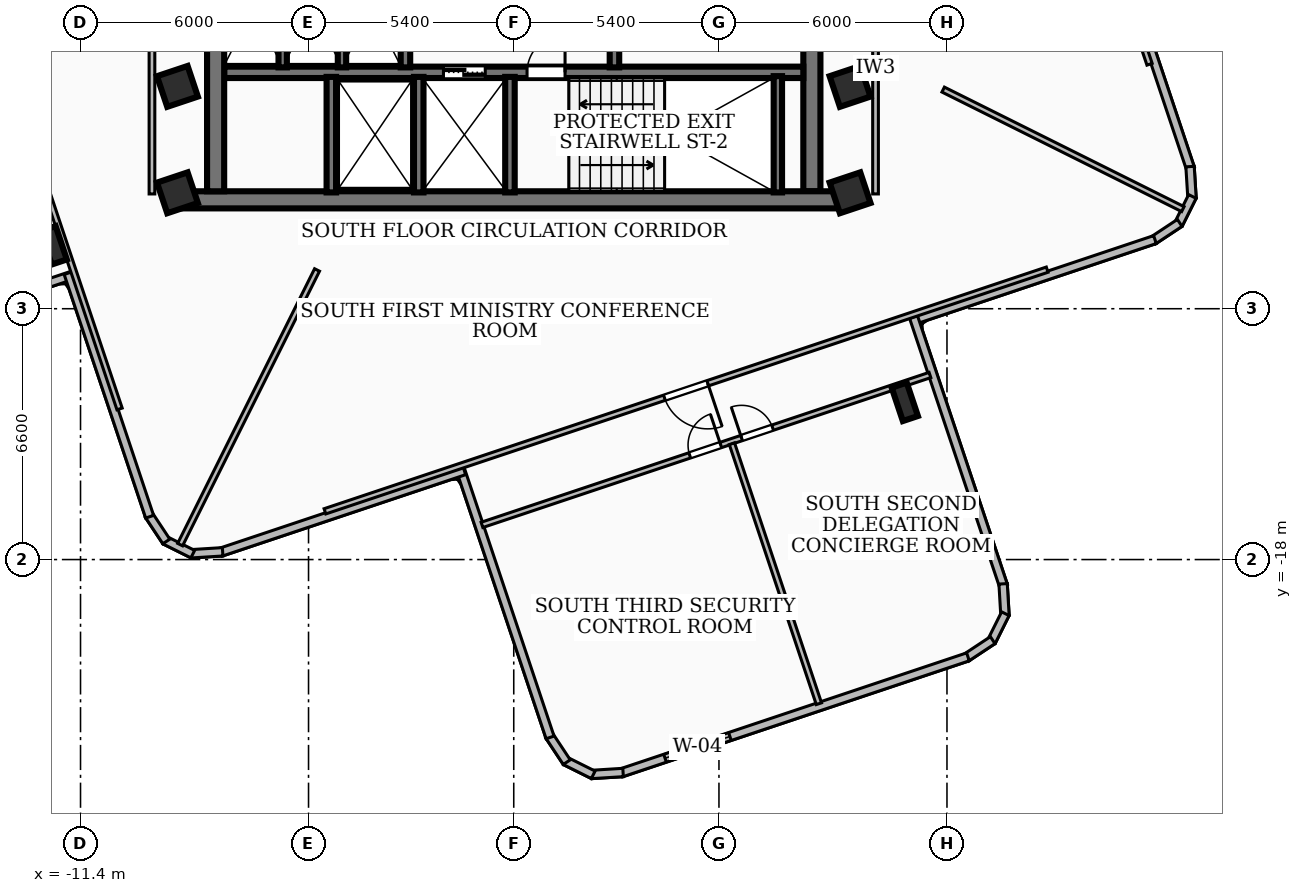
"""IFC4 building model, lengths in metres.
Left out: names, types, materials, properties, quantities, classifications, styles, units other than length and angle.
Written with IfcOpenShell. Run it as: python <this file> out.ifc"""

import sys

from ifc_helpers import new_model, si_unit, direction, frame, frame_2d, origin, origin_2d, place, context, subcontext, project, spatial, rectangle, i_section, extrude, element, fill, save


model = new_model("IFC4")
c1 = context("Model", 3, precision=1e-05, world=origin(), true_north=direction((0.0, 1.0)))
c2 = subcontext(c1, "Body", "Model", "MODEL_VIEW")
j1 = project(units=[si_unit("LENGTHUNIT", "METRE"), si_unit("PLANEANGLEUNIT", "RADIAN")], contexts=[c1])
p1 = place(None, origin())
s1 = spatial("IfcSite", under=j1, at=p1, CompositionType="ELEMENT")
p2 = place(p1, origin())
s2 = spatial("IfcBuilding", under=s1, at=p2, CompositionType="ELEMENT")
p3 = place(p2, frame((0.0, 0.0, 159.48)))
s3 = spatial("IfcBuildingStorey", under=s2, at=p3, CompositionType="ELEMENT", Elevation=159.48)
p4 = place(p3, frame((8.78, -8.535, 0.0), z_axis=(0.0, 0.0, 1.0), x_axis=(-1.0, 0.0, 0.0)))
e1 = element("IfcWall", 1, at=p4, inside=s3, PredefinedType="SHEAR", context=c2, shape_type="SweptSolid", body=[
    extrude(rectangle(XDim=17.56, YDim=0.45, at=frame_2d((8.78, 0.0))), origin(), (0.0, 0.0, 1.0), 3.34),
])
for number, where, z_axis, x_axis in (
    (2, (-7.845, -8.31, 0.0), (0.0, 0.0, 1.0), (0.0, 1.0, 0.0)),
    (3, (7.845, -1.975, 0.0), (0.0, 0.0, 1.0), (0.0, -1.0, 0.0)),
):
    element("IfcWall", number, at=place(p3, frame(where, z_axis=z_axis, x_axis=x_axis)), inside=s3, PredefinedType="SHEAR", context=c2, shape_type="SweptSolid", body=[
        extrude(rectangle(XDim=6.335, YDim=0.45, at=frame_2d((3.167, 0.0))), origin(), (0.0, 0.0, 1.0), 3.34),
    ])
p5 = place(p3, frame((-7.62, -5.18, 0.0), z_axis=(0.0, 0.0, 1.0), x_axis=(1.0, 0.0, 0.0)))
e4 = element("IfcWall", 4, at=p5, inside=s3, PredefinedType="SOLIDWALL", context=c2, shape_type="SweptSolid", body=[
    extrude(rectangle(XDim=15.24, YDim=0.3, at=frame_2d((7.62, 0.0))), origin(), (0.0, 0.0, 1.0), 3.34),
])
p6 = place(p5, frame((5.77, 0.0, 0.0)))
e5 = element("IfcOpeningElement", 5, at=p6, cuts=e4, PredefinedType="OPENING", context=c2, shape_type="SweptSolid", body=[
    extrude(rectangle(XDim=1.1, YDim=2.15, at=frame_2d((0.55, 1.075))), frame((0.0, 0.16, 0.0), z_axis=(0.0, -1.0, 0.0), x_axis=(1.0, 0.0, 0.0)), (0.0, 0.0, 1.0), 0.32),
])
p7 = place(p5, frame((7.97, 0.0, 0.0)))
e6 = element("IfcOpeningElement", 6, at=p7, cuts=e4, PredefinedType="OPENING", context=c2, shape_type="SweptSolid", body=[
    extrude(rectangle(XDim=1.0, YDim=2.1, at=frame_2d((0.5, 1.05))), frame((0.0, 0.16, 0.0), z_axis=(0.0, -1.0, 0.0), x_axis=(1.0, 0.0, 0.0)), (0.0, 0.0, 1.0), 0.32),
])
p8 = place(p3, frame((6.95, -8.34, 0.0), z_axis=(0.0, 0.0, 1.0), x_axis=(0.0, 1.0, 0.0)))
e7 = element("IfcWall", 7, at=p8, inside=s3, PredefinedType="SOLIDWALL", context=c2, shape_type="SweptSolid", body=[
    extrude(rectangle(XDim=3.06, YDim=0.22, at=frame_2d((1.53, 0.0))), origin(), (0.0, 0.0, 1.0), 3.34),
])
for number, where, z_axis, x_axis in (
    (8, (-0.1, -8.34, 0.0), (0.0, 0.0, 1.0), (0.0, 1.0, 0.0)),
    (9, (-2.5, -8.34, 0.0), (0.0, 0.0, 1.0), (0.0, 1.0, 0.0)),
    (10, (-4.8, -8.34, 0.0), (0.0, 0.0, 1.0), (0.0, 1.0, 0.0)),
):
    element("IfcWall", number, at=place(p3, frame(where, z_axis=z_axis, x_axis=x_axis)), inside=s3, PredefinedType="SOLIDWALL", context=c2, shape_type="SweptSolid", body=[
        extrude(rectangle(XDim=3.04, YDim=0.25, at=frame_2d((1.52, 0.0))), origin(), (0.0, 0.0, 1.0), 3.34),
    ])
for number, where, z_axis, x_axis in (
    (11, (-2.85, -5.05, 0.0), (0.0, 0.0, 1.0), (0.0, 1.0, 0.0)),
    (12, (2.65, -5.05, 0.0), (0.0, 0.0, 1.0), (0.0, 1.0, 0.0)),
):
    element("IfcWall", number, at=place(p3, frame(where, z_axis=z_axis, x_axis=x_axis)), inside=s3, PredefinedType="SOLIDWALL", context=c2, shape_type="SweptSolid", body=[
        extrude(rectangle(XDim=3.07, YDim=0.25, at=frame_2d((1.535, 0.0))), origin(), (0.0, 0.0, 1.0), 3.34),
    ])
for number, where, z_axis, x_axis in (
    (13, (-6.08, -5.05, 0.0), (0.0, 0.0, 1.0), (0.0, 1.0, 0.0)),
    (14, (-4.52, -5.05, 0.0), (0.0, 0.0, 1.0), (0.0, 1.0, 0.0)),
):
    element("IfcWall", number, at=place(p3, frame(where, z_axis=z_axis, x_axis=x_axis)), inside=s3, PredefinedType="SOLIDWALL", context=c2, shape_type="SweptSolid", body=[
        extrude(rectangle(XDim=3.07, YDim=0.22, at=frame_2d((1.535, 0.0))), origin(), (0.0, 0.0, 1.0), 3.34),
    ])
for number, where, z_axis, x_axis in (
    (15, (-8.85, -5.55, 0.0), (0.0, 0.0, 1.0), (0.948, 0.317, 0.0)),
    (16, (8.85, -5.55, 0.0), (0.0, 0.0, 1.0), (0.948, 0.317, 0.0)),
    (17, (8.85, -8.35, 0.0), (0.0, 0.0, 1.0), (0.948, 0.317, 0.0)),
    (18, (-8.85, -8.35, 0.0), (0.0, 0.0, 1.0), (0.948, 0.317, 0.0)),
):
    element("IfcColumn", number, at=place(p3, frame(where, z_axis=z_axis, x_axis=x_axis)), inside=s3, PredefinedType="COLUMN", context=c2, shape_type="SweptSolid", body=[
        extrude(rectangle(XDim=0.85, YDim=0.85, at=origin_2d()), origin(), (0.0, 0.0, 1.0), 3.6),
    ])
for number, where, z_axis, x_axis in (
    (19, (-12.106, -9.731, 0.0), (0.0, 0.0, 1.0), (0.948, 0.317, 0.0)),
    (20, (3.29, -19.536, 0.0), (0.0, 0.0, 1.0), (0.948, 0.317, 0.0)),
    (21, (10.29, -13.85, 0.0), (0.0, 0.0, 1.0), (0.948, 0.317, 0.0)),
):
    element("IfcColumn", number, at=place(p3, frame(where, z_axis=z_axis, x_axis=x_axis)), inside=s3, PredefinedType="COLUMN", context=c2, shape_type="SweptSolid", body=[
        extrude(i_section(OverallWidth=0.418, OverallDepth=0.927, WebThickness=0.019, FlangeThickness=0.032, at=origin_2d()), origin(), (0.0, 0.0, 1.0), 3.6),
    ])
p9 = place(p3, frame((-11.615, -10.519, 0.0), z_axis=(0.0, 0.0, 1.0), x_axis=(-0.948329626758, -0.317286808759, 0.0)))
e22 = element("IfcWall", 22, at=p9, inside=s3, PredefinedType="SOLIDWALL", context=c2, shape_type="SweptSolid", body=[
    extrude(rectangle(XDim=9.058, YDim=0.22, at=frame_2d((4.529, 0.0))), origin(), (0.0, 0.0, 1.0), 3.34),
])
p10 = place(p9, frame((5.558, 0.0, 0.85)))
e23 = element("IfcOpeningElement", 23, at=p10, cuts=e22, PredefinedType="OPENING", context=c2, shape_type="SweptSolid", body=[
    extrude(rectangle(XDim=2.4, YDim=2.1, at=frame_2d((1.2, 1.05))), frame((0.0, 0.12, 0.0), z_axis=(0.0, -1.0, 0.0), x_axis=(1.0, 0.0, 0.0)), (0.0, 0.0, 1.0), 0.24),
])
p11 = place(p3, frame((15.662, -1.3, 0.0), z_axis=(0.0, 0.0, 1.0), x_axis=(0.317224676093, -0.948350412494, 0.0)))
e24 = element("IfcWall", 24, at=p11, inside=s3, PredefinedType="SOLIDWALL", context=c2, shape_type="SweptSolid", body=[
    extrude(rectangle(XDim=6.758, YDim=0.22, at=frame_2d((3.379, 0.0))), origin(), (0.0, 0.0, 1.0), 3.34),
])
p12 = place(p3, frame((17.796, -7.66, 0.0), z_axis=(0.0, 0.0, 1.0), x_axis=(0.062305442082, -0.998057128569, 0.0)))
e25 = element("IfcWall", 25, at=p12, inside=s3, PredefinedType="SOLIDWALL", context=c2, shape_type="SweptSolid", body=[
    extrude(rectangle(XDim=0.835, YDim=0.22, at=frame_2d((0.417, 0.0))), origin(), (0.0, 0.0, 1.0), 3.34),
])
p13 = place(p3, frame((17.857, -8.446, 0.0), z_axis=(0.0, 0.0, 1.0), x_axis=(-0.446258139106, -0.894904281631, 0.0)))
e26 = element("IfcWall", 26, at=p13, inside=s3, PredefinedType="SOLIDWALL", context=c2, shape_type="SweptSolid", body=[
    extrude(rectangle(XDim=0.818, YDim=0.22, at=frame_2d((0.409, 0.0))), origin(), (0.0, 0.0, 1.0), 3.34),
])
p14 = place(p3, frame((17.524, -9.142, 0.0), z_axis=(0.0, 0.0, 1.0), x_axis=(-0.833756011094, -0.552133058206, 0.0)))
e27 = element("IfcWall", 27, at=p14, inside=s3, PredefinedType="SOLIDWALL", context=c2, shape_type="SweptSolid", body=[
    extrude(rectangle(XDim=0.835, YDim=0.22, at=frame_2d((0.417, 0.0))), origin(), (0.0, 0.0, 1.0), 3.34),
])
p15 = place(p3, frame((16.873, -9.581, 0.0), z_axis=(0.0, 0.0, 1.0), x_axis=(-0.94829606055, -0.317387116224, 0.0)))
e28 = element("IfcWall", 28, at=p15, inside=s3, PredefinedType="SOLIDWALL", context=c2, shape_type="SweptSolid", body=[
    extrude(rectangle(XDim=6.758, YDim=0.22, at=frame_2d((3.379, 0.0))), origin(), (0.0, 0.0, 1.0), 3.34),
])
p16 = place(p3, frame((10.519, -11.615, 0.0), z_axis=(0.0, 0.0, 1.0), x_axis=(0.317347016501, -0.948309480664, 0.0)))
e29 = element("IfcWall", 29, at=p16, inside=s3, PredefinedType="SOLIDWALL", context=c2, shape_type="SweptSolid", body=[
    extrude(rectangle(XDim=7.458, YDim=0.22, at=frame_2d((3.729, 0.0))), origin(), (0.0, 0.0, 1.0), 3.34),
])
p17 = place(p3, frame((12.877, -18.639, 0.0), z_axis=(0.0, 0.0, 1.0), x_axis=(0.05880777677, -0.998269325078, 0.0)))
e30 = element("IfcWall", 30, at=p17, inside=s3, PredefinedType="SOLIDWALL", context=c2, shape_type="SweptSolid", body=[
    extrude(rectangle(XDim=0.834, YDim=0.22, at=frame_2d((0.417, 0.0))), origin(), (0.0, 0.0, 1.0), 3.34),
])
p18 = place(p3, frame((12.936, -19.425, 0.0), z_axis=(0.0, 0.0, 1.0), x_axis=(-0.446258139106, -0.894904281631, 0.0)))
e31 = element("IfcWall", 31, at=p18, inside=s3, PredefinedType="SOLIDWALL", context=c2, shape_type="SweptSolid", body=[
    extrude(rectangle(XDim=0.818, YDim=0.22, at=frame_2d((0.409, 0.0))), origin(), (0.0, 0.0, 1.0), 3.34),
])
p19 = place(p3, frame((12.603, -20.121, 0.0), z_axis=(0.0, 0.0, 1.0), x_axis=(-0.833756011094, -0.552133058206, 0.0)))
e32 = element("IfcWall", 32, at=p19, inside=s3, PredefinedType="SOLIDWALL", context=c2, shape_type="SweptSolid", body=[
    extrude(rectangle(XDim=0.835, YDim=0.22, at=frame_2d((0.417, 0.0))), origin(), (0.0, 0.0, 1.0), 3.34),
])
p20 = place(p3, frame((11.952, -20.56, 0.0), z_axis=(0.0, 0.0, 1.0), x_axis=(-0.94831980895, -0.317316151421, 0.0)))
e33 = element("IfcWall", 33, at=p20, inside=s3, PredefinedType="SOLIDWALL", context=c2, shape_type="SweptSolid", body=[
    extrude(rectangle(XDim=9.621, YDim=0.22, at=frame_2d((4.811, 0.0))), origin(), (0.0, 0.0, 1.0), 3.34),
])
p21 = place(p20, frame((6.605, 0.0, 0.85)))
e34 = element("IfcOpeningElement", 34, at=p21, cuts=e33, PredefinedType="OPENING", context=c2, shape_type="SweptSolid", body=[
    extrude(rectangle(XDim=1.8, YDim=2.0, at=frame_2d((0.9, 1.0))), frame((0.0, 0.12, 0.0), z_axis=(0.0, -1.0, 0.0), x_axis=(1.0, 0.0, 0.0)), (0.0, 0.0, 1.0), 0.24),
])
p22 = place(p3, frame((2.877, -23.603, 0.0), z_axis=(0.0, 0.0, 1.0), x_axis=(-0.998057128569, -0.062305442082, 0.0)))
e35 = element("IfcWall", 35, at=p22, inside=s3, PredefinedType="SOLIDWALL", context=c2, shape_type="SweptSolid", body=[
    extrude(rectangle(XDim=0.835, YDim=0.22, at=frame_2d((0.417, 0.0))), origin(), (0.0, 0.0, 1.0), 3.34),
])
p23 = place(p3, frame((2.091, -23.664, 0.0), z_axis=(0.0, 0.0, 1.0), x_axis=(-0.894963703084, 0.446138958356, 0.0)))
e36 = element("IfcWall", 36, at=p23, inside=s3, PredefinedType="SOLIDWALL", context=c2, shape_type="SweptSolid", body=[
    extrude(rectangle(XDim=0.818, YDim=0.22, at=frame_2d((0.409, 0.0))), origin(), (0.0, 0.0, 1.0), 3.34),
])
p24 = place(p3, frame((1.395, -23.331, 0.0), z_axis=(0.0, 0.0, 1.0), x_axis=(-0.552133058206, 0.833756011094, 0.0)))
e37 = element("IfcWall", 37, at=p24, inside=s3, PredefinedType="SOLIDWALL", context=c2, shape_type="SweptSolid", body=[
    extrude(rectangle(XDim=0.835, YDim=0.22, at=frame_2d((0.417, 0.0))), origin(), (0.0, 0.0, 1.0), 3.34),
])
p25 = place(p3, frame((0.956, -22.68, 0.0), z_axis=(0.0, 0.0, 1.0), x_axis=(-0.317347016501, 0.948309480664, 0.0)))
e38 = element("IfcWall", 38, at=p25, inside=s3, PredefinedType="SOLIDWALL", context=c2, shape_type="SweptSolid", body=[
    extrude(rectangle(XDim=7.458, YDim=0.22, at=frame_2d((3.729, 0.0))), origin(), (0.0, 0.0, 1.0), 3.34),
])
p26 = place(p3, frame((-1.3, -15.662, 0.0), z_axis=(0.0, 0.0, 1.0), x_axis=(-0.948350412494, -0.317224676093, 0.0)))
e39 = element("IfcWall", 39, at=p26, inside=s3, PredefinedType="SOLIDWALL", context=c2, shape_type="SweptSolid", body=[
    extrude(rectangle(XDim=6.758, YDim=0.22, at=frame_2d((3.379, 0.0))), origin(), (0.0, 0.0, 1.0), 3.34),
])
p27 = place(p3, frame((-7.66, -17.796, 0.0), z_axis=(0.0, 0.0, 1.0), x_axis=(-0.998057128569, -0.062305442082, 0.0)))
e40 = element("IfcWall", 40, at=p27, inside=s3, PredefinedType="SOLIDWALL", context=c2, shape_type="SweptSolid", body=[
    extrude(rectangle(XDim=0.835, YDim=0.22, at=frame_2d((0.417, 0.0))), origin(), (0.0, 0.0, 1.0), 3.34),
])
p28 = place(p3, frame((-8.446, -17.857, 0.0), z_axis=(0.0, 0.0, 1.0), x_axis=(-0.894904281631, 0.446258139106, 0.0)))
e41 = element("IfcWall", 41, at=p28, inside=s3, PredefinedType="SOLIDWALL", context=c2, shape_type="SweptSolid", body=[
    extrude(rectangle(XDim=0.818, YDim=0.22, at=frame_2d((0.409, 0.0))), origin(), (0.0, 0.0, 1.0), 3.34),
])
p29 = place(p3, frame((-9.142, -17.524, 0.0), z_axis=(0.0, 0.0, 1.0), x_axis=(-0.552133058206, 0.833756011094, 0.0)))
e42 = element("IfcWall", 42, at=p29, inside=s3, PredefinedType="SOLIDWALL", context=c2, shape_type="SweptSolid", body=[
    extrude(rectangle(XDim=0.835, YDim=0.22, at=frame_2d((0.417, 0.0))), origin(), (0.0, 0.0, 1.0), 3.34),
])
p30 = place(p3, frame((-9.581, -16.873, 0.0), z_axis=(0.0, 0.0, 1.0), x_axis=(-0.317387116224, 0.94829606055, 0.0)))
e43 = element("IfcWall", 43, at=p30, inside=s3, PredefinedType="SOLIDWALL", context=c2, shape_type="SweptSolid", body=[
    extrude(rectangle(XDim=6.758, YDim=0.22, at=frame_2d((3.379, 0.0))), origin(), (0.0, 0.0, 1.0), 3.34),
])
p31 = place(p3, frame((-9.52, -8.38, 0.0), z_axis=(0.0, 0.0, 1.0), x_axis=(0.0, 1.0, 0.0)))
e44 = element("IfcWall", 44, at=p31, inside=s3, PredefinedType="PARTITIONING", context=c2, shape_type="SweptSolid", body=[
    extrude(rectangle(XDim=6.63, YDim=0.15, at=frame_2d((3.315, 0.0))), origin(), (0.0, 0.0, 1.0), 2.644),
])
p32 = place(p3, frame((9.52, -8.38, 0.0), z_axis=(0.0, 0.0, 1.0), x_axis=(0.0, 1.0, 0.0)))
e45 = element("IfcWall", 45, at=p32, inside=s3, PredefinedType="PARTITIONING", context=c2, shape_type="SweptSolid", body=[
    extrude(rectangle(XDim=6.63, YDim=0.15, at=frame_2d((3.315, 0.0))), origin(), (0.0, 0.0, 1.0), 3.34),
])
p33 = place(p3, frame((-5.176, -10.38, 0.0), z_axis=(0.0, 0.0, 1.0), x_axis=(-0.446173290391, -0.894946587759, 0.0)))
e46 = element("IfcWall", 46, at=p33, inside=s3, PredefinedType="PARTITIONING", context=c2, shape_type="SweptSolid", body=[
    extrude(rectangle(XDim=8.075, YDim=0.145, at=frame_2d((4.038, 0.0))), origin(), (0.0, 0.0, 1.0), 3.34),
])
p34 = place(p3, frame((11.3, -5.634, 0.0), z_axis=(0.0, 0.0, 1.0), x_axis=(0.894904738475, -0.446257222972, 0.0)))
e47 = element("IfcWall", 47, at=p34, inside=s3, PredefinedType="PARTITIONING", context=c2, shape_type="SweptSolid", body=[
    extrude(rectangle(XDim=7.048, YDim=0.145, at=frame_2d((3.524, 0.0))), origin(), (0.0, 0.0, 1.0), 3.34),
])
p35 = place(p3, frame((10.372, 14.037, 0.0), z_axis=(0.0, 0.0, 1.0), x_axis=(0.317298382655, -0.94832575435, 0.0)))
e48 = element("IfcWall", 48, at=p35, inside=s3, PredefinedType="PARTITIONING", context=c2, shape_type="SweptSolid", body=[
    extrude(rectangle(XDim=20.041, YDim=0.145, at=frame_2d((10.021, 0.0))), origin(), (0.0, 0.0, 1.0), 2.644),
])
p36 = place(p35, frame((9.42, 0.0, 0.0)))
e49 = element("IfcOpeningElement", 49, at=p36, cuts=e48, PredefinedType="OPENING", context=c2, shape_type="SweptSolid", body=[
    extrude(rectangle(XDim=1.2, YDim=2.1, at=frame_2d((0.6, 1.05))), frame((0.0, 0.083, 0.0), z_axis=(0.0, -1.0, 0.0), x_axis=(1.0, 0.0, 0.0)), (0.0, 0.0, 1.0), 0.165),
])
p37 = place(p3, frame((-10.372, -14.037, 0.0), z_axis=(0.0, 0.0, 1.0), x_axis=(-0.317298382655, 0.94832575435, 0.0)))
e50 = element("IfcWall", 50, at=p37, inside=s3, PredefinedType="PARTITIONING", context=c2, shape_type="SweptSolid", body=[
    extrude(rectangle(XDim=20.041, YDim=0.145, at=frame_2d((10.021, 0.0))), origin(), (0.0, 0.0, 1.0), 2.644),
])
p38 = place(p37, frame((9.42, 0.0, 0.0)))
e51 = element("IfcOpeningElement", 51, at=p38, cuts=e50, PredefinedType="OPENING", context=c2, shape_type="SweptSolid", body=[
    extrude(rectangle(XDim=1.2, YDim=2.1, at=frame_2d((0.6, 1.05))), frame((0.0, 0.083, 0.0), z_axis=(0.0, -1.0, 0.0), x_axis=(1.0, 0.0, 0.0)), (0.0, 0.0, 1.0), 0.165),
])
p39 = place(p3, frame((14.037, -10.372, 0.0), z_axis=(0.0, 0.0, 1.0), x_axis=(-0.94832575435, -0.317298382655, 0.0)))
e52 = element("IfcWall", 52, at=p39, inside=s3, PredefinedType="PARTITIONING", context=c2, shape_type="SweptSolid", body=[
    extrude(rectangle(XDim=20.041, YDim=0.145, at=frame_2d((10.021, 0.0))), origin(), (0.0, 0.0, 1.0), 2.644),
])
p40 = place(p39, frame((9.42, 0.0, 0.0)))
e53 = element("IfcOpeningElement", 53, at=p40, cuts=e52, PredefinedType="OPENING", context=c2, shape_type="SweptSolid", body=[
    extrude(rectangle(XDim=1.2, YDim=2.1, at=frame_2d((0.6, 1.05))), frame((0.0, 0.083, 0.0), z_axis=(0.0, -1.0, 0.0), x_axis=(1.0, 0.0, 0.0)), (0.0, 0.0, 1.0), 0.165),
])
p41 = place(p3, frame((5.741, -14.951, 0.0), z_axis=(0.0, 0.0, 1.0), x_axis=(0.317273194857, -0.948334181513, 0.0)))
e54 = element("IfcWall", 54, at=p41, inside=s3, PredefinedType="PARTITIONING", context=c2, shape_type="SweptSolid", body=[
    extrude(rectangle(XDim=7.215, YDim=0.145, at=frame_2d((3.607, 0.0))), origin(), (0.0, 0.0, 1.0), 3.34),
])
p42 = place(p3, frame((-0.836, -17.088, 0.0), z_axis=(0.0, 0.0, 1.0), x_axis=(0.948331136084, 0.317282297544, 0.0)))
e55 = element("IfcWall", 55, at=p42, inside=s3, PredefinedType="PARTITIONING", context=c2, shape_type="SweptSolid", body=[
    extrude(rectangle(XDim=12.43, YDim=0.145, at=frame_2d((6.215, 0.0))), origin(), (0.0, 0.0, 1.0), 2.644),
])
p43 = place(p42, frame((5.765, 0.0, 0.0)))
e56 = element("IfcOpeningElement", 56, at=p43, cuts=e55, PredefinedType="OPENING", context=c2, shape_type="SweptSolid", body=[
    extrude(rectangle(XDim=0.86, YDim=2.04, at=frame_2d((0.43, 1.02))), frame((0.0, 0.083, 0.0), z_axis=(0.0, -1.0, 0.0), x_axis=(1.0, 0.0, 0.0)), (0.0, 0.0, 1.0), 0.165),
])
p44 = place(p42, frame((7.204, 0.0, 0.0)))
e57 = element("IfcOpeningElement", 57, at=p44, cuts=e55, PredefinedType="OPENING", context=c2, shape_type="SweptSolid", body=[
    extrude(rectangle(XDim=0.86, YDim=2.04, at=frame_2d((0.43, 1.02))), frame((0.0, 0.083, 0.0), z_axis=(0.0, -1.0, 0.0), x_axis=(1.0, 0.0, 0.0)), (0.0, 0.0, 1.0), 0.165),
])
p45 = place(p21, origin())
e58 = element("IfcWindow", 58, at=p45, inside=s3, PartitioningType="SINGLE_PANEL", PredefinedType="WINDOW", context=c2, shape_type="SweptSolid", body=[
    extrude(rectangle(XDim=1.8, YDim=2.0, at=frame_2d((0.9, 1.0))), frame((0.0, 0.03, 0.0), z_axis=(0.0, -1.0, 0.0), x_axis=(1.0, 0.0, 0.0)), (0.0, 0.0, 1.0), 0.06),
])
fill(e34, e58)
p46 = place(p6, origin())
e59 = element("IfcDoor", 59, at=p46, inside=s3, OperationType="DOUBLE_DOOR_SLIDING", PredefinedType="DOOR", context=c2, shape_type="SweptSolid", body=[
    extrude(rectangle(XDim=1.1, YDim=2.15, at=frame_2d((0.55, 1.075))), frame((0.0, 0.025, 0.0), z_axis=(0.0, -1.0, 0.0), x_axis=(1.0, 0.0, 0.0)), (0.0, 0.0, 1.0), 0.05),
])
fill(e5, e59)
p47 = place(p7, origin())
e60 = element("IfcDoor", 60, at=p47, inside=s3, OperationType="SINGLE_SWING_RIGHT", PredefinedType="DOOR", context=c2, shape_type="SweptSolid", body=[
    extrude(rectangle(XDim=1.0, YDim=2.1, at=frame_2d((0.5, 1.05))), frame((0.0, 0.025, 0.0), z_axis=(0.0, -1.0, 0.0), x_axis=(1.0, 0.0, 0.0)), (0.0, 0.0, 1.0), 0.05),
])
fill(e6, e60)
p48 = place(p40, origin())
e61 = element("IfcDoor", 61, at=p48, inside=s3, OperationType="SINGLE_SWING_LEFT", PredefinedType="DOOR", context=c2, shape_type="SweptSolid", body=[
    extrude(rectangle(XDim=1.2, YDim=2.1, at=frame_2d((0.6, 1.05))), frame((0.0, 0.025, 0.0), z_axis=(0.0, -1.0, 0.0), x_axis=(1.0, 0.0, 0.0)), (0.0, 0.0, 1.0), 0.05),
])
fill(e53, e61)
p49 = place(p43, origin())
e62 = element("IfcDoor", 62, at=p49, inside=s3, OperationType="SINGLE_SWING_RIGHT", PredefinedType="DOOR", context=c2, shape_type="SweptSolid", body=[
    extrude(rectangle(XDim=0.86, YDim=2.04, at=frame_2d((0.43, 1.02))), frame((0.0, 0.025, 0.0), z_axis=(0.0, -1.0, 0.0), x_axis=(1.0, 0.0, 0.0)), (0.0, 0.0, 1.0), 0.05),
])
fill(e56, e62)
p50 = place(p44, origin())
e63 = element("IfcDoor", 63, at=p50, inside=s3, OperationType="SINGLE_SWING_LEFT", PredefinedType="DOOR", context=c2, shape_type="SweptSolid", body=[
    extrude(rectangle(XDim=0.86, YDim=2.04, at=frame_2d((0.43, 1.02))), frame((0.0, 0.025, 0.0), z_axis=(0.0, -1.0, 0.0), x_axis=(1.0, 0.0, 0.0)), (0.0, 0.0, 1.0), 0.05),
])
fill(e57, e63)
save(model, sys.argv[1])
